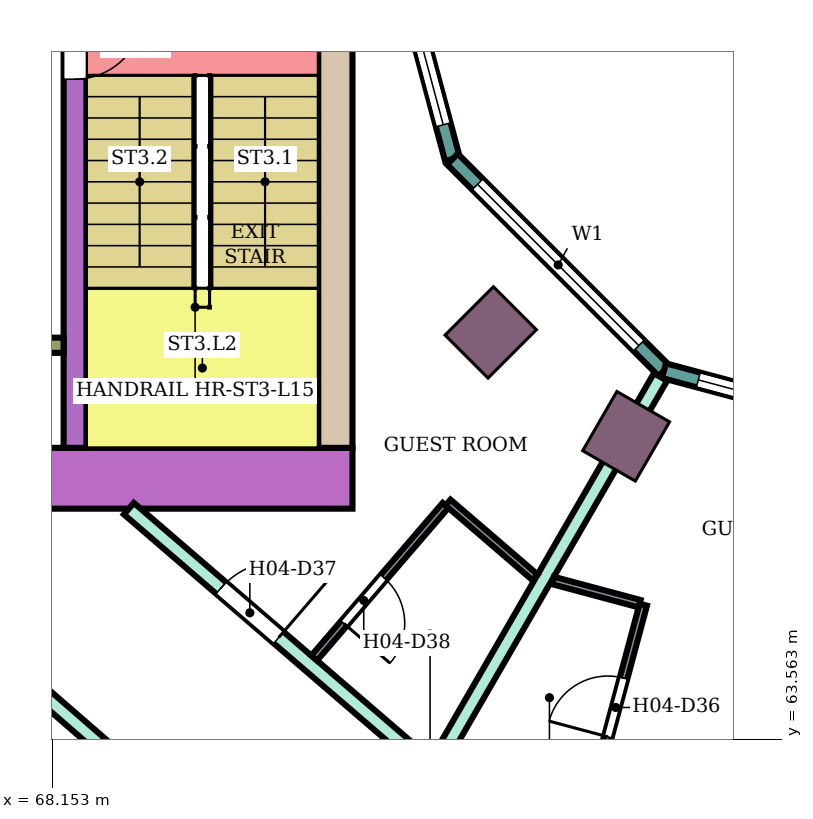
"""IFC4 building model, lengths in metres.
Left out: names, types, materials, properties, quantities, classifications, styles, units other than length and angle.
Written with IfcOpenShell. Run it as: python <this file> out.ifc"""

import sys

from ifc_helpers import new_model, si_unit, direction, frame, frame_2d, origin, origin_2d, place, context, subcontext, project, spatial, rectangle, extrude, element, fill, save


model = new_model("IFC4")
c1 = context("Model", 3, precision=1e-05, world=origin(), true_north=direction((0.0, 1.0)))
c2 = subcontext(c1, "Body", "Model", "MODEL_VIEW")
j1 = project(units=[si_unit("LENGTHUNIT", "METRE"), si_unit("PLANEANGLEUNIT", "RADIAN")], contexts=[c1])
p1 = place(None, origin())
s1 = spatial("IfcSite", under=j1, at=p1, CompositionType="ELEMENT")
p2 = place(p1, origin())
s2 = spatial("IfcBuilding", under=s1, at=p2, CompositionType="ELEMENT")
p3 = place(p2, frame((0.0, 0.0, 66.8)))
s3 = spatial("IfcBuildingStorey", under=s2, at=p3, CompositionType="ELEMENT", Elevation=66.8)
for number, where, z_axis, x_axis in (
    (1, (73.919, 68.919, 0.0), (0.0, 0.0, 1.0), (-0.707, -0.707, 0.0)),
    (2, (75.7, 67.552, 0.0), (0.0, 0.0, 1.0), (-0.5, -0.866, 0.0)),
):
    element("IfcColumn", number, at=place(p3, frame(where, z_axis=z_axis, x_axis=x_axis)), inside=s3, PredefinedType="COLUMN", context=c2, shape_type="SweptSolid", body=[
        extrude(rectangle(XDim=0.9, YDim=0.8, at=origin_2d()), origin(), (0.0, 0.0, 1.0), 3.8),
    ])
p4 = place(p3, frame((72.1, 67.0, 0.0), z_axis=(0.0, 0.0, 1.0), x_axis=(-1.0, 0.0, 0.0)))
e3 = element("IfcWall", 3, at=p4, inside=s3, PredefinedType="SHEAR", context=c2, shape_type="SweptSolid", body=[
    extrude(rectangle(XDim=14.7, YDim=0.8, at=frame_2d((7.35, 0.0))), origin(), (0.0, 0.0, 1.0), 3.48),
])
p5 = place(p4, frame((4.2, 0.0, 0.0)))
e4 = element("IfcOpeningElement", 4, at=p5, cuts=e3, PredefinedType="OPENING", context=c2, shape_type="SweptSolid", body=[
    extrude(rectangle(XDim=2.4, YDim=2.4, at=frame_2d((1.2, 1.2))), frame((0.0, 0.41, 0.0), z_axis=(0.0, -1.0, 0.0), x_axis=(1.0, 0.0, 0.0)), (0.0, 0.0, 1.0), 0.82),
])
p6 = place(p3, frame((71.875, 75.0, 0.0), z_axis=(0.0, 0.0, 1.0), x_axis=(0.0, -1.0, 0.0)))
e5 = element("IfcWall", 5, at=p6, inside=s3, PredefinedType="SHEAR", context=c2, shape_type="SweptSolid", body=[
    extrude(rectangle(XDim=7.6, YDim=0.45, at=frame_2d((3.8, 0.0))), origin(), (0.0, 0.0, 1.0), 3.48),
])
p7 = place(p3, frame((68.45, 75.0, 0.0), z_axis=(0.0, 0.0, 1.0), x_axis=(0.0, -1.0, 0.0)))
e6 = element("IfcWall", 6, at=p7, inside=s3, PredefinedType="SHEAR", context=c2, shape_type="SweptSolid", body=[
    extrude(rectangle(XDim=7.6, YDim=0.3, at=frame_2d((3.8, 0.0))), origin(), (0.0, 0.0, 1.0), 3.48),
])
p8 = place(p7, frame((1.85, 0.0, 0.0)))
e7 = element("IfcOpeningElement", 7, at=p8, cuts=e6, PredefinedType="OPENING", context=c2, shape_type="SweptSolid", body=[
    extrude(rectangle(XDim=0.9, YDim=2.1, at=frame_2d((0.45, 1.05))), frame((0.0, 0.16, 0.0), z_axis=(0.0, -1.0, 0.0), x_axis=(1.0, 0.0, 0.0)), (0.0, 0.0, 1.0), 0.32),
])
p9 = place(p3, frame((68.3, 68.75, 0.0), z_axis=(0.0, 0.0, 1.0), x_axis=(-1.0, 0.0, 0.0)))
e8 = element("IfcWall", 8, at=p9, inside=s3, PredefinedType="SHEAR", context=c2, shape_type="SweptSolid", body=[
    extrude(rectangle(XDim=4.65, YDim=0.2, at=frame_2d((2.325, 0.0))), origin(), (0.0, 0.0, 1.0), 3.48),
])
p10 = place(p3, frame((72.396, 75.0, 0.0), z_axis=(0.0, 0.0, 1.0), x_axis=(0.258789828301, -0.965933654434, 0.0)))
e9 = element("IfcWall", 9, at=p10, inside=s3, PredefinedType="NOTDEFINED", context=c2, shape_type="SweptSolid", body=[
    extrude(rectangle(XDim=3.936, YDim=0.2, at=frame_2d((1.968, 0.0))), origin(), (0.0, 0.0, 1.0), 3.8),
])
p11 = place(p10, frame((0.468, 0.0, 0.9)))
e10 = element("IfcOpeningElement", 10, at=p11, cuts=e9, PredefinedType="OPENING", context=c2, shape_type="SweptSolid", body=[
    extrude(rectangle(XDim=3.0, YDim=2.3, at=frame_2d((1.5, 1.15))), frame((0.0, 0.11, 0.0), z_axis=(0.0, -1.0, 0.0), x_axis=(1.0, 0.0, 0.0)), (0.0, 0.0, 1.0), 0.22),
])
p12 = place(p3, frame((73.415, 71.198, 0.0), z_axis=(0.0, 0.0, 1.0), x_axis=(0.707106781187, -0.707106781187, 0.0)))
e11 = element("IfcWall", 11, at=p12, inside=s3, PredefinedType="NOTDEFINED", context=c2, shape_type="SweptSolid", body=[
    extrude(rectangle(XDim=3.936, YDim=0.2, at=frame_2d((1.968, 0.0))), origin(), (0.0, 0.0, 1.0), 3.8),
])
p13 = place(p12, frame((0.468, 0.0, 0.9)))
e12 = element("IfcOpeningElement", 12, at=p13, cuts=e11, PredefinedType="OPENING", context=c2, shape_type="SweptSolid", body=[
    extrude(rectangle(XDim=3.0, YDim=2.3, at=frame_2d((1.5, 1.15))), frame((0.0, 0.11, 0.0), z_axis=(0.0, -1.0, 0.0), x_axis=(1.0, 0.0, 0.0)), (0.0, 0.0, 1.0), 0.22),
])
p14 = place(p3, frame((76.198, 68.415, 0.0), z_axis=(0.0, 0.0, 1.0), x_axis=(0.965933654434, -0.258789828301, 0.0)))
e13 = element("IfcWall", 13, at=p14, inside=s3, PredefinedType="NOTDEFINED", context=c2, shape_type="SweptSolid", body=[
    extrude(rectangle(XDim=3.936, YDim=0.2, at=frame_2d((1.968, 0.0))), origin(), (0.0, 0.0, 1.0), 3.8),
])
p15 = place(p14, frame((0.468, 0.0, 0.9)))
e14 = element("IfcOpeningElement", 14, at=p15, cuts=e13, PredefinedType="OPENING", context=c2, shape_type="SweptSolid", body=[
    extrude(rectangle(XDim=3.0, YDim=2.3, at=frame_2d((1.5, 1.15))), frame((0.0, 0.11, 0.0), z_axis=(0.0, -1.0, 0.0), x_axis=(1.0, 0.0, 0.0)), (0.0, 0.0, 1.0), 0.22),
])
p16 = place(p3, frame((66.924, 65.111, 0.0), z_axis=(0.0, 0.0, 1.0), x_axis=(0.755023669255, -0.655697536113, 0.0)))
e15 = element("IfcWall", 15, at=p16, inside=s3, PredefinedType="PARTITIONING", context=c2, shape_type="SweptSolid", body=[
    extrude(rectangle(XDim=6.396, YDim=0.2, at=frame_2d((3.198, 0.0))), origin(), (0.0, 0.0, 1.0), 3.35),
])
p17 = place(p16, frame((2.658, 0.0, 0.0)))
e16 = element("IfcOpeningElement", 16, at=p17, cuts=e15, PredefinedType="OPENING", context=c2, shape_type="SweptSolid", body=[
    extrude(rectangle(XDim=1.8, YDim=2.1, at=frame_2d((0.9, 1.05))), frame((0.0, 0.11, 0.0), z_axis=(0.0, -1.0, 0.0), x_axis=(1.0, 0.0, 0.0)), (0.0, 0.0, 1.0), 0.22),
])
p18 = place(p3, frame((69.158, 66.6, 0.0), z_axis=(0.0, 0.0, 1.0), x_axis=(0.757976058094, -0.652282373943, 0.0)))
e17 = element("IfcWall", 17, at=p18, inside=s3, PredefinedType="PARTITIONING", context=c2, shape_type="SweptSolid", body=[
    extrude(rectangle(XDim=5.16, YDim=0.2, at=frame_2d((2.58, 0.0))), origin(), (0.0, 0.0, 1.0), 3.35),
])
p19 = place(p18, frame((1.6, 0.0, 0.0)))
e18 = element("IfcOpeningElement", 18, at=p19, cuts=e17, PredefinedType="OPENING", context=c2, shape_type="SweptSolid", body=[
    extrude(rectangle(XDim=1.0, YDim=2.1, at=frame_2d((0.5, 1.05))), frame((0.0, 0.11, 0.0), z_axis=(0.0, -1.0, 0.0), x_axis=(1.0, 0.0, 0.0)), (0.0, 0.0, 1.0), 0.22),
])
p20 = place(p3, frame((73.174, 63.176, 0.0), z_axis=(0.0, 0.0, 1.0), x_axis=(0.500257106344, 0.865876912472, 0.0)))
e19 = element("IfcWall", 19, at=p20, inside=s3, PredefinedType="PARTITIONING", context=c2, shape_type="SweptSolid", body=[
    extrude(rectangle(XDim=5.955, YDim=0.2, at=frame_2d((2.978, 0.0))), origin(), (0.0, 0.0, 1.0), 3.35),
])
p21 = place(p3, frame((71.596, 64.635, 0.0), z_axis=(0.0, 0.0, 1.0), x_axis=(0.652285007511, 0.757973791748, 0.0)))
e20 = element("IfcWall", 20, at=p21, inside=s3, PredefinedType="PARTITIONING", context=c2, shape_type="SweptSolid", body=[
    extrude(rectangle(XDim=2.65, YDim=0.1, at=frame_2d((1.325, 0.0))), origin(), (0.0, 0.0, 1.0), 3.35),
])
p22 = place(p21, frame((0.6, 0.0, 0.0)))
e21 = element("IfcOpeningElement", 21, at=p22, cuts=e20, PredefinedType="OPENING", context=c2, shape_type="SweptSolid", body=[
    extrude(rectangle(XDim=0.8, YDim=2.1, at=frame_2d((0.4, 1.05))), frame((0.0, 0.06, 0.0), z_axis=(0.0, -1.0, 0.0), x_axis=(1.0, 0.0, 0.0)), (0.0, 0.0, 1.0), 0.12),
])
p23 = place(p3, frame((73.357, 66.681, 0.0), z_axis=(0.0, 0.0, 1.0), x_axis=(0.758263469747, -0.651948242154, 0.0)))
e22 = element("IfcWall", 22, at=p23, inside=s3, PredefinedType="PARTITIONING", context=c2, shape_type="SweptSolid", body=[
    extrude(rectangle(XDim=1.511, YDim=0.1, at=frame_2d((0.755, 0.0))), origin(), (0.0, 0.0, 1.0), 3.35),
])
p24 = place(p3, frame((74.739, 65.655, 0.0), z_axis=(0.0, 0.0, 1.0), x_axis=(0.96591107063, -0.258874107695, 0.0)))
e23 = element("IfcWall", 23, at=p24, inside=s3, PredefinedType="PARTITIONING", context=c2, shape_type="SweptSolid", body=[
    extrude(rectangle(XDim=1.179, YDim=0.1, at=frame_2d((0.589, 0.0))), origin(), (0.0, 0.0, 1.0), 3.35),
])
p25 = place(p3, frame((75.227, 62.729, 0.0), z_axis=(0.0, 0.0, 1.0), x_axis=(0.258945475746, 0.965891940432, 0.0)))
e24 = element("IfcWall", 24, at=p25, inside=s3, PredefinedType="PARTITIONING", context=c2, shape_type="SweptSolid", body=[
    extrude(rectangle(XDim=2.7, YDim=0.1, at=frame_2d((1.35, 0.0))), origin(), (0.0, 0.0, 1.0), 3.35),
])
p26 = place(p25, frame((0.9, 0.0, 0.0)))
e25 = element("IfcOpeningElement", 25, at=p26, cuts=e24, PredefinedType="OPENING", context=c2, shape_type="SweptSolid", body=[
    extrude(rectangle(XDim=0.8, YDim=2.1, at=frame_2d((0.4, 1.05))), frame((0.0, 0.06, 0.0), z_axis=(0.0, -1.0, 0.0), x_axis=(1.0, 0.0, 0.0)), (0.0, 0.0, 1.0), 0.12),
])
p27 = place(p11, origin())
e26 = element("IfcWindow", 26, at=p27, inside=s3, PartitioningType="SINGLE_PANEL", PredefinedType="WINDOW", context=c2, shape_type="SweptSolid", body=[
    extrude(rectangle(XDim=3.0, YDim=2.3, at=frame_2d((1.5, 1.15))), frame((0.0, 0.03, 0.0), z_axis=(0.0, -1.0, 0.0), x_axis=(1.0, 0.0, 0.0)), (0.0, 0.0, 1.0), 0.06),
])
fill(e10, e26)
p28 = place(p13, origin())
e27 = element("IfcWindow", 27, at=p28, inside=s3, PartitioningType="SINGLE_PANEL", PredefinedType="WINDOW", context=c2, shape_type="SweptSolid", body=[
    extrude(rectangle(XDim=3.0, YDim=2.3, at=frame_2d((1.5, 1.15))), frame((0.0, 0.03, 0.0), z_axis=(0.0, -1.0, 0.0), x_axis=(1.0, 0.0, 0.0)), (0.0, 0.0, 1.0), 0.06),
])
fill(e12, e27)
p29 = place(p15, origin())
e28 = element("IfcWindow", 28, at=p29, inside=s3, PartitioningType="SINGLE_PANEL", PredefinedType="WINDOW", context=c2, shape_type="SweptSolid", body=[
    extrude(rectangle(XDim=3.0, YDim=2.3, at=frame_2d((1.5, 1.15))), frame((0.0, 0.03, 0.0), z_axis=(0.0, -1.0, 0.0), x_axis=(1.0, 0.0, 0.0)), (0.0, 0.0, 1.0), 0.06),
])
fill(e14, e28)
p30 = place(p26, origin())
e29 = element("IfcDoor", 29, at=p30, inside=s3, OperationType="SINGLE_SWING_LEFT", PredefinedType="DOOR", context=c2, shape_type="SweptSolid", body=[
    extrude(rectangle(XDim=0.8, YDim=2.1, at=frame_2d((0.4, 1.05))), frame((0.0, 0.025, 0.0), z_axis=(0.0, -1.0, 0.0), x_axis=(1.0, 0.0, 0.0)), (0.0, 0.0, 1.0), 0.05),
])
fill(e25, e29)
p31 = place(p19, origin())
e30 = element("IfcDoor", 30, at=p31, inside=s3, OperationType="SINGLE_SWING_RIGHT", PredefinedType="DOOR", context=c2, shape_type="SweptSolid", body=[
    extrude(rectangle(XDim=1.0, YDim=2.1, at=frame_2d((0.5, 1.05))), frame((0.0, 0.025, 0.0), z_axis=(0.0, -1.0, 0.0), x_axis=(1.0, 0.0, 0.0)), (0.0, 0.0, 1.0), 0.05),
])
fill(e18, e30)
p32 = place(p22, frame((0.8, 0.0, 0.0), z_axis=(0.0, 0.0, 1.0), x_axis=(-1.0, 0.0, 0.0)))
e31 = element("IfcDoor", 31, at=p32, inside=s3, OperationType="SINGLE_SWING_RIGHT", PredefinedType="DOOR", context=c2, shape_type="SweptSolid", body=[
    extrude(rectangle(XDim=0.8, YDim=2.1, at=frame_2d((0.4, 1.05))), frame((0.0, 0.025, 0.0), z_axis=(0.0, -1.0, 0.0), x_axis=(1.0, 0.0, 0.0)), (0.0, 0.0, 1.0), 0.05),
])
fill(e21, e31)
p33 = place(p8, origin())
e32 = element("IfcDoor", 32, at=p33, inside=s3, OperationType="SINGLE_SWING_LEFT", PredefinedType="DOOR", context=c2, shape_type="SweptSolid", body=[
    extrude(rectangle(XDim=0.9, YDim=2.1, at=frame_2d((0.45, 1.05))), frame((0.0, 0.025, 0.0), z_axis=(0.0, -1.0, 0.0), x_axis=(1.0, 0.0, 0.0)), (0.0, 0.0, 1.0), 0.05),
])
fill(e7, e32)
save(model, sys.argv[1])
